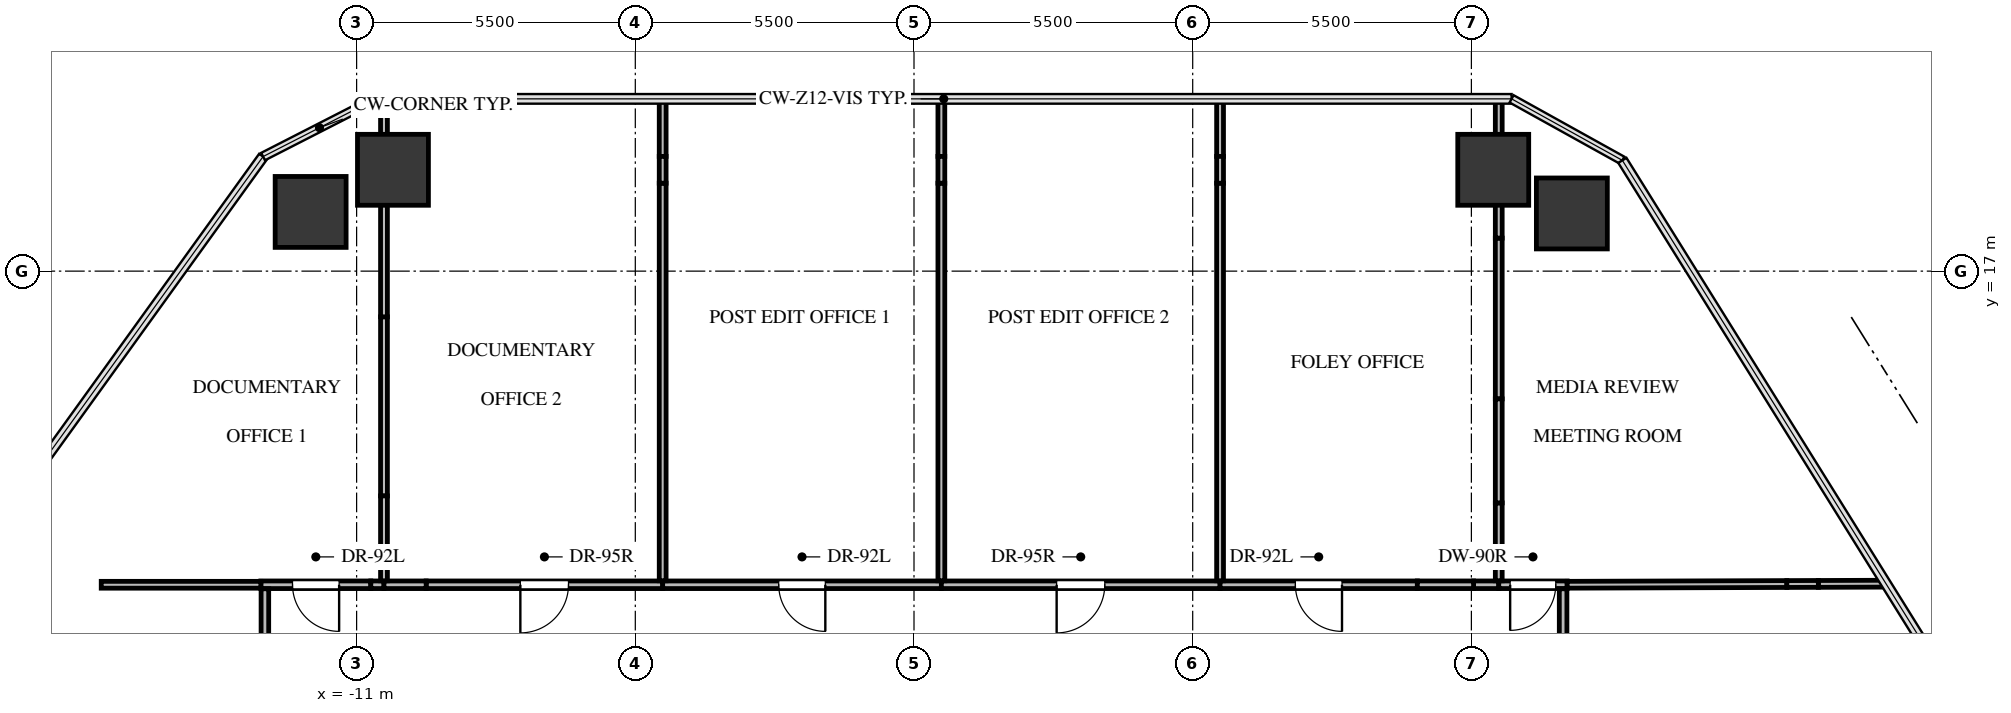
"""IFC4 building model, lengths in metres.
Left out: names, types, materials, properties, quantities, classifications, styles, units other than length and angle.
Written with IfcOpenShell. Run it as: python <this file> out.ifc"""

import sys

from ifc_helpers import new_model, si_unit, direction, frame, frame_2d, origin, origin_2d, place, context, subcontext, project, spatial, rectangle, extrude, source, transform, mapped, element, fill, save


model = new_model("IFC4")
c1 = context("Model", 3, precision=1e-05, world=origin(), true_north=direction((0.0, 1.0)))
c2 = subcontext(c1, "Body", "Model", "MODEL_VIEW")
j1 = project(units=[si_unit("LENGTHUNIT", "METRE"), si_unit("PLANEANGLEUNIT", "RADIAN")], contexts=[c1])
p1 = place(None, origin())
s1 = spatial("IfcSite", under=j1, at=p1, CompositionType="ELEMENT")
p2 = place(p1, origin())
s2 = spatial("IfcBuilding", under=s1, at=p2, CompositionType="ELEMENT")
p3 = place(p2, frame((0.0, 0.0, 78.3)))
s3 = spatial("IfcBuildingStorey", under=s2, at=p3, CompositionType="ELEMENT", Elevation=78.3)
m1 = source(origin(), c2, "Body", "SweptSolid", [
    extrude(rectangle(XDim=1.4, YDim=1.4, at=origin_2d()), origin(), (0.0, 0.0, 1.0), 3.0),
])
for number, where, z_axis, x_axis in (
    (1, (-11.907, 18.168, -0.24), (0.0, 0.0, 1.0), (1.0, 0.0, 0.0)),
    (2, (-10.283, 19.0, -0.24), (0.0, 0.0, 1.0), (1.0, 0.0, 0.0)),
    (3, (11.431, 19.0, -0.24), (0.0, 0.0, 1.0), (1.0, 0.0, 0.0)),
    (4, (12.983, 18.138, -0.24), (0.0, 0.0, 1.0), (1.0, 0.0, 0.0)),
):
    element("IfcColumn", number, at=place(p3, frame(where, z_axis=z_axis, x_axis=x_axis)), inside=s3, PredefinedType="COLUMN", context=c2, shape_type="MappedRepresentation", body=[
        mapped(m1, transform((0.0, 0.0, 0.0), x_axis=(1.0, 0.0, 0.0), y_axis=(0.0, 1.0, 0.0), z_axis=(0.0, 0.0, 1.0), scale=1.0)),
    ])
p4 = place(p3, frame((-10.72, 10.81, 0.0), z_axis=(0.0, 0.0, 1.0), x_axis=(-1.0, 0.0, 0.0)))
e5 = element("IfcWall", 5, at=p4, inside=s3, PredefinedType="PARTITIONING", context=c2, shape_type="SweptSolid", body=[
    extrude(rectangle(XDim=2.17, YDim=0.15, at=frame_2d((1.085, 0.0))), origin(), (0.0, 0.0, 1.0), 2.745),
])
p5 = place(p4, frame((0.625, 0.0, 0.0)))
e6 = element("IfcOpeningElement", 6, at=p5, cuts=e5, PredefinedType="OPENING", context=c2, shape_type="SweptSolid", body=[
    extrude(rectangle(XDim=0.92, YDim=2.1, at=frame_2d((0.46, 1.05))), frame((0.0, 0.085, 0.0), z_axis=(0.0, -1.0, 0.0), x_axis=(1.0, 0.0, 0.0)), (0.0, 0.0, 1.0), 0.17),
])
p6 = place(p3, frame((-10.46, 10.81, 0.0), z_axis=(0.0, 0.0, 1.0), x_axis=(-1.0, 0.0, 0.0)))
e7 = element("IfcWall", 7, at=p6, inside=s3, PredefinedType="PARTITIONING", context=c2, shape_type="SweptSolid", body=[
    extrude(rectangle(XDim=0.26, YDim=0.15, at=frame_2d((0.13, 0.0))), origin(), (0.0, 0.0, 1.0), 1.83),
])
p7 = place(p3, frame((-4.96, 10.81, 0.0), z_axis=(0.0, 0.0, 1.0), x_axis=(-1.0, 0.0, 0.0)))
e8 = element("IfcWall", 8, at=p7, inside=s3, PredefinedType="PARTITIONING", context=c2, shape_type="SweptSolid", body=[
    extrude(rectangle(XDim=4.667, YDim=0.15, at=frame_2d((2.334, 0.0))), origin(), (0.0, 0.0, 1.0), 2.298),
])
p8 = place(p7, frame((1.859, 0.0, 0.0)))
e9 = element("IfcOpeningElement", 9, at=p8, cuts=e8, PredefinedType="OPENING", context=c2, shape_type="SweptSolid", body=[
    extrude(rectangle(XDim=0.95, YDim=2.1, at=frame_2d((0.475, 1.05))), frame((0.0, 0.085, 0.0), z_axis=(0.0, -1.0, 0.0), x_axis=(1.0, 0.0, 0.0)), (0.0, 0.0, 1.0), 0.17),
])
p9 = place(p3, frame((-9.627, 10.81, 0.0), z_axis=(0.0, 0.0, 1.0), x_axis=(-1.0, 0.0, 0.0)))
e10 = element("IfcWall", 10, at=p9, inside=s3, PredefinedType="PARTITIONING", context=c2, shape_type="SweptSolid", body=[
    extrude(rectangle(XDim=0.833, YDim=0.15, at=frame_2d((0.416, 0.0))), origin(), (0.0, 0.0, 1.0), 1.83),
])
p10 = place(p3, frame((0.54, 10.81, 0.0), z_axis=(0.0, 0.0, 1.0), x_axis=(-1.0, 0.0, 0.0)))
e11 = element("IfcWall", 11, at=p10, inside=s3, PredefinedType="PARTITIONING", context=c2, shape_type="SweptSolid", body=[
    extrude(rectangle(XDim=5.5, YDim=0.15, at=frame_2d((2.75, 0.0))), origin(), (0.0, 0.0, 1.0), 2.745),
])
p11 = place(p10, frame((2.29, 0.0, 0.0)))
e12 = element("IfcOpeningElement", 12, at=p11, cuts=e11, PredefinedType="OPENING", context=c2, shape_type="SweptSolid", body=[
    extrude(rectangle(XDim=0.92, YDim=2.1, at=frame_2d((0.46, 1.05))), frame((0.0, 0.085, 0.0), z_axis=(0.0, -1.0, 0.0), x_axis=(1.0, 0.0, 0.0)), (0.0, 0.0, 1.0), 0.17),
])
p12 = place(p3, frame((6.04, 10.81, 0.0), z_axis=(0.0, 0.0, 1.0), x_axis=(-1.0, 0.0, 0.0)))
e13 = element("IfcWall", 13, at=p12, inside=s3, PredefinedType="PARTITIONING", context=c2, shape_type="SweptSolid", body=[
    extrude(rectangle(XDim=5.5, YDim=0.15, at=frame_2d((2.75, 0.0))), origin(), (0.0, 0.0, 1.0), 2.298),
])
p13 = place(p12, frame((2.275, 0.0, 0.0)))
e14 = element("IfcOpeningElement", 14, at=p13, cuts=e13, PredefinedType="OPENING", context=c2, shape_type="SweptSolid", body=[
    extrude(rectangle(XDim=0.95, YDim=2.1, at=frame_2d((0.475, 1.05))), frame((0.0, 0.085, 0.0), z_axis=(0.0, -1.0, 0.0), x_axis=(1.0, 0.0, 0.0)), (0.0, 0.0, 1.0), 0.17),
])
p14 = place(p3, frame((11.54, 10.81, 0.0), z_axis=(0.0, 0.0, 1.0), x_axis=(-1.0, 0.0, 0.0)))
e15 = element("IfcWall", 15, at=p14, inside=s3, PredefinedType="PARTITIONING", context=c2, shape_type="SweptSolid", body=[
    extrude(rectangle(XDim=0.498, YDim=0.15, at=frame_2d((0.249, 0.0))), origin(), (0.0, 0.0, 1.0), 2.745),
])
p15 = place(p3, frame((9.933, 10.81, 0.0), z_axis=(0.0, 0.0, 1.0), x_axis=(-1.0, 0.0, 0.0)))
e16 = element("IfcWall", 16, at=p15, inside=s3, PredefinedType="PARTITIONING", context=c2, shape_type="SweptSolid", body=[
    extrude(rectangle(XDim=3.893, YDim=0.15, at=frame_2d((1.947, 0.0))), origin(), (0.0, 0.0, 1.0), 2.745),
])
p16 = place(p15, frame((1.487, 0.0, 0.0)))
e17 = element("IfcOpeningElement", 17, at=p16, cuts=e16, PredefinedType="OPENING", context=c2, shape_type="SweptSolid", body=[
    extrude(rectangle(XDim=0.92, YDim=2.1, at=frame_2d((0.46, 1.05))), frame((0.0, 0.085, 0.0), z_axis=(0.0, -1.0, 0.0), x_axis=(1.0, 0.0, 0.0)), (0.0, 0.0, 1.0), 0.17),
])
p17 = place(p3, frame((11.042, 10.81, 0.0), z_axis=(0.0, 0.0, 1.0), x_axis=(-1.0, 0.0, 0.0)))
e18 = element("IfcWall", 18, at=p17, inside=s3, PredefinedType="PARTITIONING", context=c2, shape_type="SweptSolid", body=[
    extrude(rectangle(XDim=1.109, YDim=0.15, at=frame_2d((0.555, 0.0))), origin(), (0.0, 0.0, 1.0), 1.83),
])
p18 = place(p3, frame((12.89, 10.81, 0.0), z_axis=(0.0, 0.0, 1.0), x_axis=(-1.0, 0.0, 0.0)))
e19 = element("IfcWall", 19, at=p18, inside=s3, PredefinedType="PARTITIONING", context=c2, shape_type="SweptSolid", body=[
    extrude(rectangle(XDim=1.35, YDim=0.15, at=frame_2d((0.675, 0.0))), origin(), (0.0, 0.0, 1.0), 2.745),
])
p19 = place(p18, frame((0.225, 0.0, 0.0)))
e20 = element("IfcOpeningElement", 20, at=p19, cuts=e19, PredefinedType="OPENING", context=c2, shape_type="SweptSolid", body=[
    extrude(rectangle(XDim=0.9, YDim=2.05, at=frame_2d((0.45, 1.025))), frame((0.0, 0.085, 0.0), z_axis=(0.0, -1.0, 0.0), x_axis=(1.0, 0.0, 0.0)), (0.0, 0.0, 1.0), 0.17),
])
p20 = place(p3, frame((-12.81, 10.731, 0.0), z_axis=(0.0, 0.0, 1.0), x_axis=(0.0, -1.0, 0.0)))
e21 = element("IfcWall", 21, at=p20, inside=s3, PredefinedType="PARTITIONING", context=c2, shape_type="SweptSolid", body=[
    extrude(rectangle(XDim=6.191, YDim=0.15, at=frame_2d((3.095, 0.0))), origin(), (0.0, 0.0, 1.0), 2.745),
])
p21 = place(p20, frame((2.621, 0.0, 0.0)))
e22 = element("IfcOpeningElement", 22, at=p21, cuts=e21, PredefinedType="OPENING", context=c2, shape_type="SweptSolid", body=[
    extrude(rectangle(XDim=0.95, YDim=2.1, at=frame_2d((0.475, 1.05))), frame((0.0, 0.085, 0.0), z_axis=(0.0, -1.0, 0.0), x_axis=(1.0, 0.0, 0.0)), (0.0, 0.0, 1.0), 0.17),
])
p22 = place(p3, frame((12.81, 4.54, 0.0), z_axis=(0.0, 0.0, 1.0), x_axis=(0.0, 1.0, 0.0)))
e23 = element("IfcWall", 23, at=p22, inside=s3, PredefinedType="PARTITIONING", context=c2, shape_type="SweptSolid", body=[
    extrude(rectangle(XDim=6.191, YDim=0.15, at=frame_2d((3.095, 0.0))), origin(), (0.0, 0.0, 1.0), 2.745),
])
p23 = place(p22, frame((2.646, 0.0, 0.0)))
e24 = element("IfcOpeningElement", 24, at=p23, cuts=e23, PredefinedType="OPENING", context=c2, shape_type="SweptSolid", body=[
    extrude(rectangle(XDim=0.9, YDim=2.05, at=frame_2d((0.45, 1.025))), frame((0.0, 0.085, 0.0), z_axis=(0.0, -1.0, 0.0), x_axis=(1.0, 0.0, 0.0)), (0.0, 0.0, 1.0), 0.17),
])
p24 = place(p3, frame((-10.46, 16.098, 0.0), z_axis=(0.0, 0.0, 1.0), x_axis=(0.0, -1.0, 0.0)))
e25 = element("IfcWall", 25, at=p24, inside=s3, PredefinedType="PARTITIONING", context=c2, shape_type="SweptSolid", body=[
    extrude(rectangle(XDim=3.535, YDim=0.135, at=frame_2d((1.768, 0.0))), origin(), (0.0, 0.0, 1.0), 1.83),
])
p25 = place(p3, frame((-10.46, 20.4, 0.0), z_axis=(0.0, 0.0, 1.0), x_axis=(0.0, -1.0, 0.0)))
e26 = element("IfcWall", 26, at=p25, inside=s3, PredefinedType="PARTITIONING", context=c2, shape_type="SweptSolid", body=[
    extrude(rectangle(XDim=4.302, YDim=0.135, at=frame_2d((2.151, 0.0))), origin(), (0.0, 0.0, 1.0), 1.577),
])
p26 = place(p3, frame((-10.46, 12.563, 0.0), z_axis=(0.0, 0.0, 1.0), x_axis=(0.0, -1.0, 0.0)))
e27 = element("IfcWall", 27, at=p26, inside=s3, PredefinedType="PARTITIONING", context=c2, shape_type="SweptSolid", body=[
    extrude(rectangle(XDim=1.675, YDim=0.135, at=frame_2d((0.837, 0.0))), origin(), (0.0, 0.0, 1.0), 1.83),
])
p27 = place(p3, frame((-12.89, 10.81, 0.0), z_axis=(0.0, 0.0, 1.0), x_axis=(-1.0, 0.0, 0.0)))
e28 = element("IfcWall", 28, at=p27, inside=s3, PredefinedType="PARTITIONING", context=c2, shape_type="SweptSolid", body=[
    extrude(rectangle(XDim=3.15, YDim=0.135, at=frame_2d((1.575, 0.0))), origin(), (0.0, 0.0, 1.0), 2.745),
])
p28 = place(p3, frame((-4.96, 20.4, 0.0), z_axis=(0.0, 0.0, 1.0), x_axis=(0.0, -1.0, 0.0)))
e29 = element("IfcWall", 29, at=p28, inside=s3, PredefinedType="PARTITIONING", context=c2, shape_type="SweptSolid", body=[
    extrude(rectangle(XDim=1.135, YDim=0.135, at=frame_2d((0.568, 0.0))), origin(), (0.0, 0.0, 1.0), 2.745),
])
p29 = place(p3, frame((-4.96, 18.736, 0.0), z_axis=(0.0, 0.0, 1.0), x_axis=(0.0, -1.0, 0.0)))
e30 = element("IfcWall", 30, at=p29, inside=s3, PredefinedType="PARTITIONING", context=c2, shape_type="SweptSolid", body=[
    extrude(rectangle(XDim=7.847, YDim=0.135, at=frame_2d((3.923, 0.0))), origin(), (0.0, 0.0, 1.0), 2.745),
])
p30 = place(p3, frame((-4.96, 19.264, 0.0), z_axis=(0.0, 0.0, 1.0), x_axis=(0.0, -1.0, 0.0)))
e31 = element("IfcWall", 31, at=p30, inside=s3, PredefinedType="PARTITIONING", context=c2, shape_type="SweptSolid", body=[
    extrude(rectangle(XDim=0.529, YDim=0.135, at=frame_2d((0.264, 0.0))), origin(), (0.0, 0.0, 1.0), 2.08),
])
p31 = place(p3, frame((0.54, 20.4, 0.0), z_axis=(0.0, 0.0, 1.0), x_axis=(0.0, -1.0, 0.0)))
e32 = element("IfcWall", 32, at=p31, inside=s3, PredefinedType="PARTITIONING", context=c2, shape_type="SweptSolid", body=[
    extrude(rectangle(XDim=1.135, YDim=0.135, at=frame_2d((0.568, 0.0))), origin(), (0.0, 0.0, 1.0), 2.745),
])
p32 = place(p3, frame((0.54, 18.736, 0.0), z_axis=(0.0, 0.0, 1.0), x_axis=(0.0, -1.0, 0.0)))
e33 = element("IfcWall", 33, at=p32, inside=s3, PredefinedType="PARTITIONING", context=c2, shape_type="SweptSolid", body=[
    extrude(rectangle(XDim=7.847, YDim=0.135, at=frame_2d((3.923, 0.0))), origin(), (0.0, 0.0, 1.0), 2.745),
])
p33 = place(p3, frame((0.54, 19.264, 0.0), z_axis=(0.0, 0.0, 1.0), x_axis=(0.0, -1.0, 0.0)))
e34 = element("IfcWall", 34, at=p33, inside=s3, PredefinedType="PARTITIONING", context=c2, shape_type="SweptSolid", body=[
    extrude(rectangle(XDim=0.529, YDim=0.135, at=frame_2d((0.264, 0.0))), origin(), (0.0, 0.0, 1.0), 2.08),
])
p34 = place(p3, frame((6.04, 20.4, 0.0), z_axis=(0.0, 0.0, 1.0), x_axis=(0.0, -1.0, 0.0)))
e35 = element("IfcWall", 35, at=p34, inside=s3, PredefinedType="PARTITIONING", context=c2, shape_type="SweptSolid", body=[
    extrude(rectangle(XDim=1.135, YDim=0.135, at=frame_2d((0.568, 0.0))), origin(), (0.0, 0.0, 1.0), 2.745),
])
p35 = place(p3, frame((6.04, 18.736, 0.0), z_axis=(0.0, 0.0, 1.0), x_axis=(0.0, -1.0, 0.0)))
e36 = element("IfcWall", 36, at=p35, inside=s3, PredefinedType="PARTITIONING", context=c2, shape_type="SweptSolid", body=[
    extrude(rectangle(XDim=7.847, YDim=0.135, at=frame_2d((3.923, 0.0))), origin(), (0.0, 0.0, 1.0), 2.745),
])
p36 = place(p3, frame((6.04, 19.264, 0.0), z_axis=(0.0, 0.0, 1.0), x_axis=(0.0, -1.0, 0.0)))
e37 = element("IfcWall", 37, at=p36, inside=s3, PredefinedType="PARTITIONING", context=c2, shape_type="SweptSolid", body=[
    extrude(rectangle(XDim=0.529, YDim=0.135, at=frame_2d((0.264, 0.0))), origin(), (0.0, 0.0, 1.0), 2.08),
])
p37 = place(p3, frame((11.54, 17.652, 0.0), z_axis=(0.0, 0.0, 1.0), x_axis=(0.0, -1.0, 0.0)))
e38 = element("IfcWall", 38, at=p37, inside=s3, PredefinedType="PARTITIONING", context=c2, shape_type="SweptSolid", body=[
    extrude(rectangle(XDim=3.173, YDim=0.135, at=frame_2d((1.586, 0.0))), origin(), (0.0, 0.0, 1.0), 1.83),
])
p38 = place(p3, frame((11.54, 12.426, 0.0), z_axis=(0.0, 0.0, 1.0), x_axis=(0.0, -1.0, 0.0)))
e39 = element("IfcWall", 39, at=p38, inside=s3, PredefinedType="PARTITIONING", context=c2, shape_type="SweptSolid", body=[
    extrude(rectangle(XDim=1.537, YDim=0.135, at=frame_2d((0.768, 0.0))), origin(), (0.0, 0.0, 1.0), 1.83),
])
p39 = place(p3, frame((11.54, 20.4, 0.0), z_axis=(0.0, 0.0, 1.0), x_axis=(0.0, -1.0, 0.0)))
e40 = element("IfcWall", 40, at=p39, inside=s3, PredefinedType="PARTITIONING", context=c2, shape_type="SweptSolid", body=[
    extrude(rectangle(XDim=2.748, YDim=0.135, at=frame_2d((1.374, 0.0))), origin(), (0.0, 0.0, 1.0), 1.577),
])
p40 = place(p3, frame((11.54, 14.479, 0.0), z_axis=(0.0, 0.0, 1.0), x_axis=(0.0, -1.0, 0.0)))
e41 = element("IfcWall", 41, at=p40, inside=s3, PredefinedType="PARTITIONING", context=c2, shape_type="SweptSolid", body=[
    extrude(rectangle(XDim=2.053, YDim=0.135, at=frame_2d((1.026, 0.0))), origin(), (0.0, 0.0, 1.0), 1.83),
])
p41 = place(p3, frame((19.182, 10.831, 0.0), z_axis=(0.0, 0.0, 1.0), x_axis=(-0.999994579825, -0.00329246432, 0.0)))
e42 = element("IfcWall", 42, at=p41, inside=s3, PredefinedType="PARTITIONING", context=c2, shape_type="SweptSolid", body=[
    extrude(rectangle(XDim=1.335, YDim=0.135, at=frame_2d((0.667, 0.0))), origin(), (0.0, 0.0, 1.0), 2.745),
])
p42 = place(p3, frame((17.225, 10.825, 0.0), z_axis=(0.0, 0.0, 1.0), x_axis=(-0.999994480721, -0.003322427884, 0.0)))
e43 = element("IfcWall", 43, at=p42, inside=s3, PredefinedType="PARTITIONING", context=c2, shape_type="SweptSolid", body=[
    extrude(rectangle(XDim=4.335, YDim=0.135, at=frame_2d((2.168, 0.0))), origin(), (0.0, 0.0, 1.0), 2.745),
])
p43 = place(p3, frame((17.847, 10.827, 0.0), z_axis=(0.0, 0.0, 1.0), x_axis=(-0.999993761903, -0.00353216007, 0.0)))
e44 = element("IfcWall", 44, at=p43, inside=s3, PredefinedType="PARTITIONING", context=c2, shape_type="SweptSolid", body=[
    extrude(rectangle(XDim=0.622, YDim=0.135, at=frame_2d((0.311, 0.0))), origin(), (0.0, 0.0, 1.0), 2.08),
])
m2 = source(origin(), c2, "Body", "SweptSolid", [
    extrude(rectangle(XDim=0.92, YDim=2.1, at=frame_2d((0.46, 1.05))), frame((0.0, 0.025, 0.0), z_axis=(0.0, -1.0, 0.0), x_axis=(1.0, 0.0, 0.0)), (0.0, 0.0, 1.0), 0.05),
])
p44 = place(p5, origin())
e45 = element("IfcDoor", 45, at=p44, inside=s3, OperationType="SINGLE_SWING_LEFT", PredefinedType="DOOR", context=c2, shape_type="MappedRepresentation", body=[
    mapped(m2, transform((0.0, 0.0, 0.0), x_axis=(1.0, 0.0, 0.0), y_axis=(0.0, 1.0, 0.0), z_axis=(0.0, 0.0, 1.0), scale=1.0)),
])
fill(e6, e45)
m3 = source(origin(), c2, "Body", "SweptSolid", [
    extrude(rectangle(XDim=0.95, YDim=2.1, at=frame_2d((0.475, 1.05))), frame((0.0, 0.025, 0.0), z_axis=(0.0, -1.0, 0.0), x_axis=(1.0, 0.0, 0.0)), (0.0, 0.0, 1.0), 0.05),
])
p45 = place(p8, origin())
e46 = element("IfcDoor", 46, at=p45, inside=s3, OperationType="SINGLE_SWING_RIGHT", PredefinedType="DOOR", context=c2, shape_type="MappedRepresentation", body=[
    mapped(m3, transform((0.0, 0.0, 0.0), x_axis=(1.0, 0.0, 0.0), y_axis=(0.0, 1.0, 0.0), z_axis=(0.0, 0.0, 1.0), scale=1.0)),
])
fill(e9, e46)
p46 = place(p11, origin())
e47 = element("IfcDoor", 47, at=p46, inside=s3, OperationType="SINGLE_SWING_LEFT", PredefinedType="DOOR", context=c2, shape_type="MappedRepresentation", body=[
    mapped(m2, transform((0.0, 0.0, 0.0), x_axis=(1.0, 0.0, 0.0), y_axis=(0.0, 1.0, 0.0), z_axis=(0.0, 0.0, 1.0), scale=1.0)),
])
fill(e12, e47)
p47 = place(p13, origin())
e48 = element("IfcDoor", 48, at=p47, inside=s3, OperationType="SINGLE_SWING_RIGHT", PredefinedType="DOOR", context=c2, shape_type="MappedRepresentation", body=[
    mapped(m3, transform((0.0, 0.0, 0.0), x_axis=(1.0, 0.0, 0.0), y_axis=(0.0, 1.0, 0.0), z_axis=(0.0, 0.0, 1.0), scale=1.0)),
])
fill(e14, e48)
p48 = place(p16, origin())
e49 = element("IfcDoor", 49, at=p48, inside=s3, OperationType="SINGLE_SWING_LEFT", PredefinedType="DOOR", context=c2, shape_type="MappedRepresentation", body=[
    mapped(m2, transform((0.0, 0.0, 0.0), x_axis=(1.0, 0.0, 0.0), y_axis=(0.0, 1.0, 0.0), z_axis=(0.0, 0.0, 1.0), scale=1.0)),
])
fill(e17, e49)
m4 = source(origin(), c2, "Body", "SweptSolid", [
    extrude(rectangle(XDim=0.9, YDim=2.05, at=frame_2d((0.45, 1.025))), frame((0.0, 0.025, 0.0), z_axis=(0.0, -1.0, 0.0), x_axis=(1.0, 0.0, 0.0)), (0.0, 0.0, 1.0), 0.05),
])
p49 = place(p19, origin())
e50 = element("IfcDoor", 50, at=p49, inside=s3, OperationType="SINGLE_SWING_RIGHT", PredefinedType="DOOR", context=c2, shape_type="MappedRepresentation", body=[
    mapped(m4, transform((0.0, 0.0, 0.0), x_axis=(1.0, 0.0, 0.0), y_axis=(0.0, 1.0, 0.0), z_axis=(0.0, 0.0, 1.0), scale=1.0)),
])
fill(e20, e50)
save(model, sys.argv[1])
